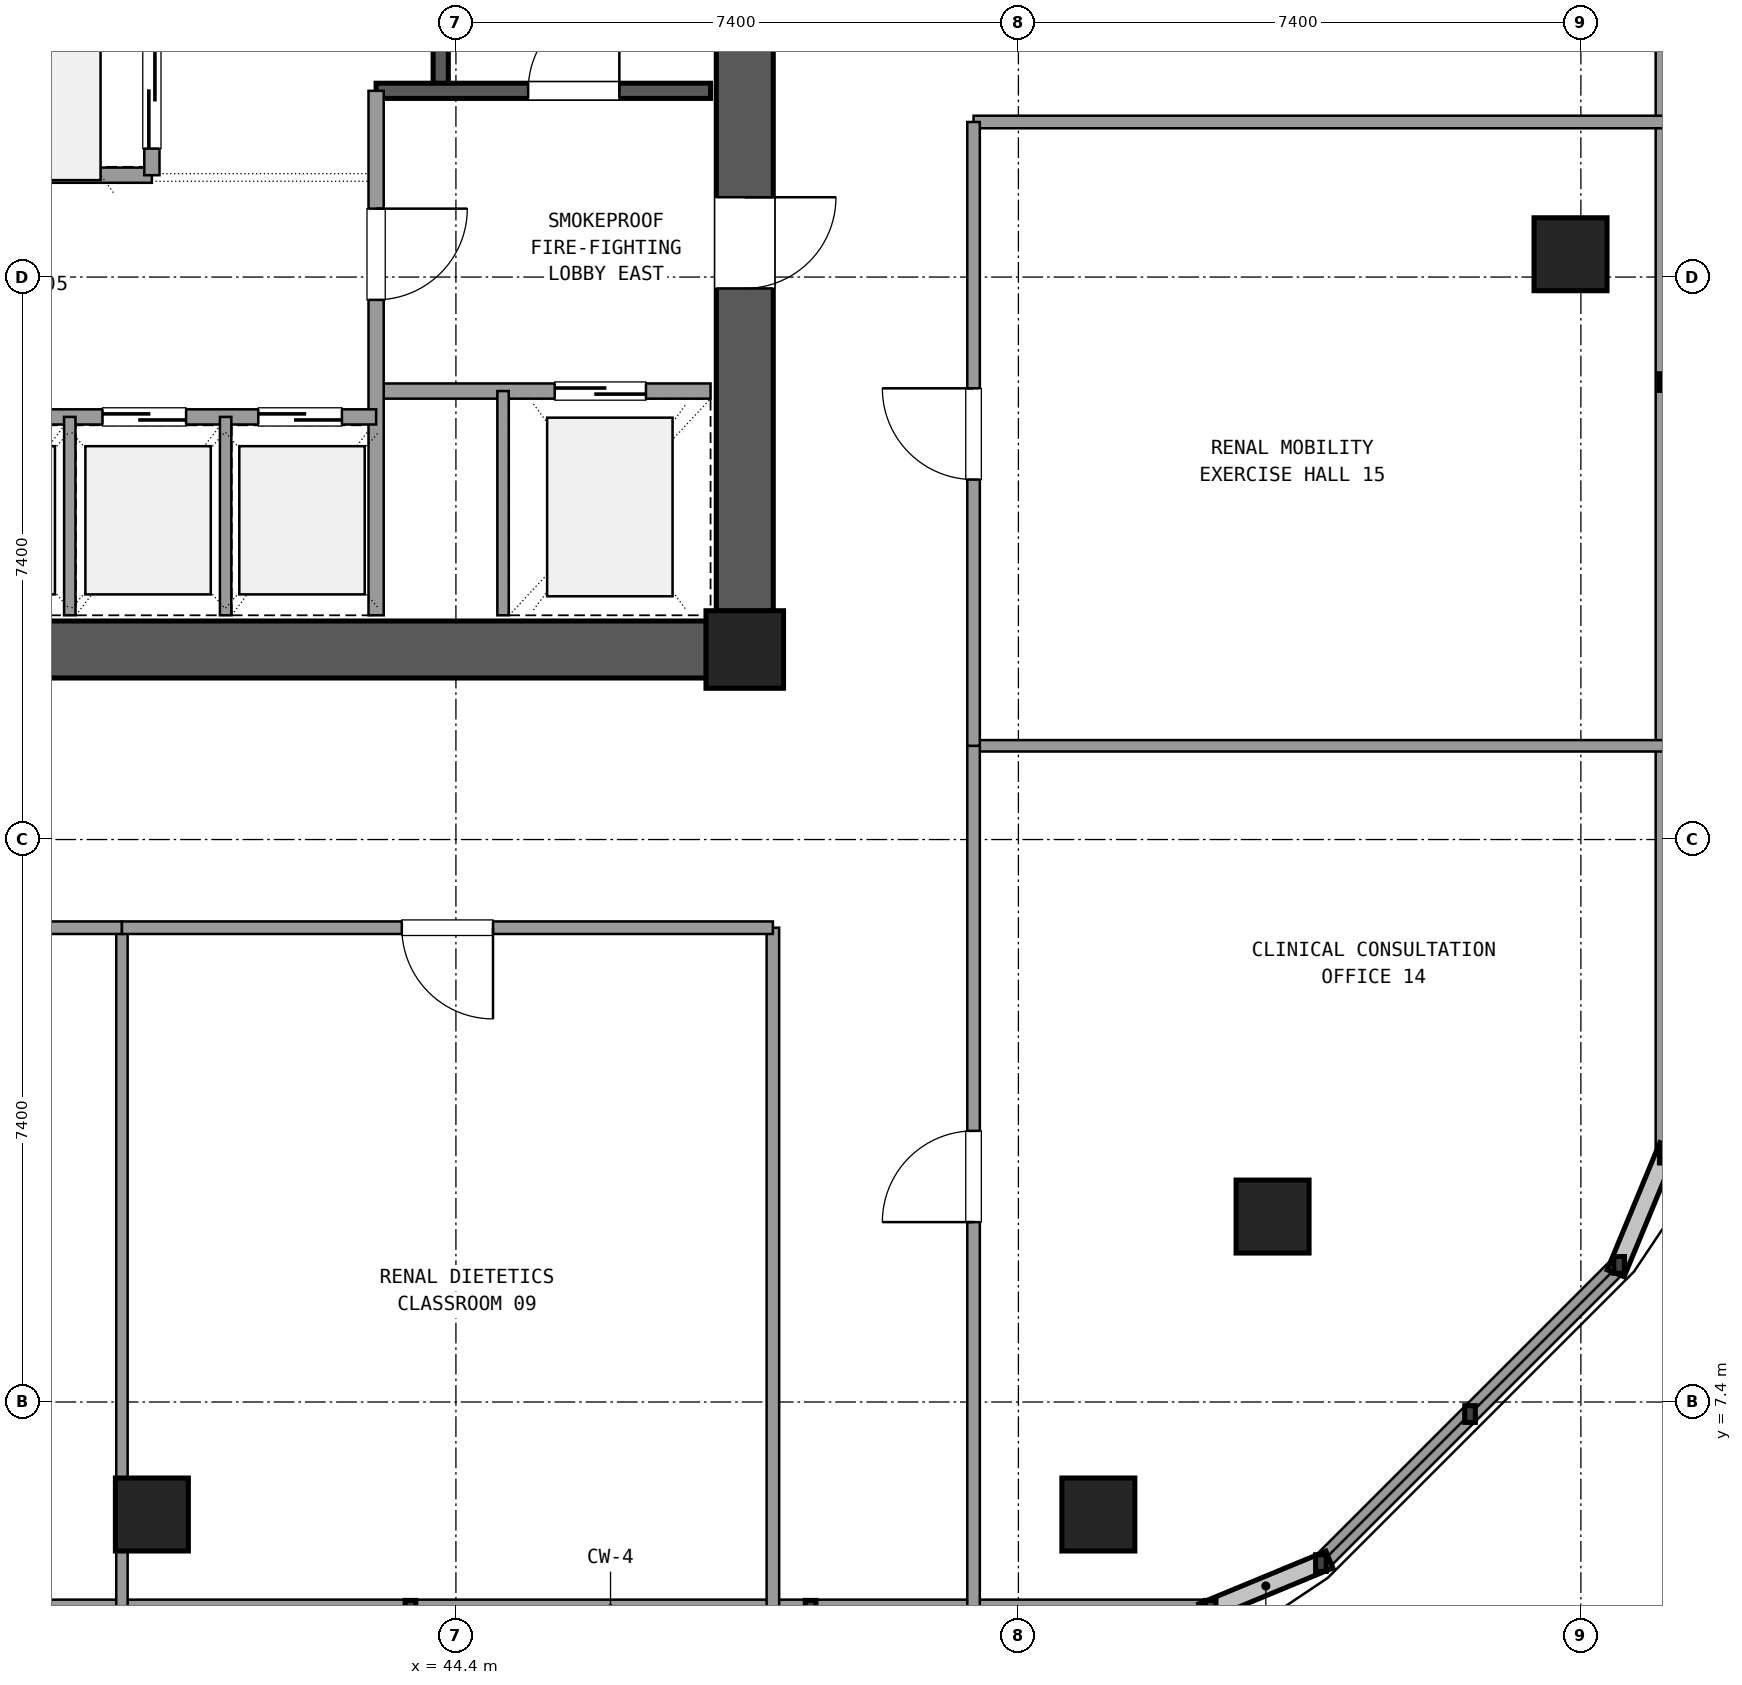
"""IFC4 building model, lengths in metres.
Left out: names, types, materials, properties, quantities, classifications, styles, units other than length and angle.
Written with IfcOpenShell. Run it as: python <this file> out.ifc"""

import sys

from ifc_helpers import new_model, si_unit, direction, frame, frame_2d, origin, origin_2d, place, context, subcontext, project, spatial, rectangle, extrude, element, fill, save


model = new_model("IFC4")
c1 = context("Model", 3, precision=1e-05, world=origin(), true_north=direction((0.0, 1.0)))
c2 = subcontext(c1, "Body", "Model", "MODEL_VIEW")
j1 = project(units=[si_unit("LENGTHUNIT", "METRE"), si_unit("PLANEANGLEUNIT", "RADIAN")], contexts=[c1])
p1 = place(None, origin())
s1 = spatial("IfcSite", under=j1, at=p1, CompositionType="ELEMENT")
p2 = place(p1, origin())
s2 = spatial("IfcBuilding", under=s1, at=p2, CompositionType="ELEMENT")
p3 = place(p2, frame((0.0, 0.0, 152.82)))
s3 = spatial("IfcBuildingStorey", under=s2, at=p3, CompositionType="ELEMENT", Elevation=152.82)
p4 = place(p3, frame((48.2, 17.3, 0.0), z_axis=(0.0, 0.0, 1.0), x_axis=(1.0, 0.0, 0.0)))
e1 = element("IfcColumn", 1, at=p4, inside=s3, PredefinedType="COLUMN", context=c2, shape_type="SweptSolid", body=[
    extrude(rectangle(XDim=1.02, YDim=1.02, at=origin_2d()), origin(), (0.0, 0.0, 1.0), 3.6),
])
p5 = place(p3, frame((37.505, 17.3, 0.0), z_axis=(0.0, 0.0, 1.0), x_axis=(1.0, 0.0, 0.0)))
e2 = element("IfcWall", 2, at=p5, inside=s3, PredefinedType="SHEAR", context=c2, shape_type="SweptSolid", body=[
    extrude(rectangle(XDim=10.19, YDim=0.75, at=frame_2d((5.095, 0.0))), origin(), (0.0, 0.0, 1.0), 3.32),
])
p6 = place(p3, frame((48.2, 17.805, 0.0), z_axis=(0.0, 0.0, 1.0), x_axis=(0.0, 1.0, 0.0)))
e3 = element("IfcWall", 3, at=p6, inside=s3, PredefinedType="SHEAR", context=c2, shape_type="SweptSolid", body=[
    extrude(rectangle(XDim=7.59, YDim=0.75, at=frame_2d((3.795, 0.0))), origin(), (0.0, 0.0, 1.0), 3.32),
])
p7 = place(p6, frame((4.245, 0.0, 0.0)))
e4 = element("IfcOpeningElement", 4, at=p7, cuts=e3, PredefinedType="OPENING", context=c2, shape_type="SweptSolid", body=[
    extrude(rectangle(XDim=1.2, YDim=2.15, at=frame_2d((0.6, 1.075))), frame((0.0, 0.385, 0.0), z_axis=(0.0, -1.0, 0.0), x_axis=(1.0, 0.0, 0.0)), (0.0, 0.0, 1.0), 0.77),
])
for number, where, z_axis, x_axis in (
    (5, (40.4, 5.92, 0.0), (0.0, 0.0, 1.0), (1.0, 0.0, 0.0)),
    (6, (52.852, 5.92, 0.0), (0.0, 0.0, 1.0), (1.0, 0.0, 0.0)),
    (7, (55.144, 9.84, 0.0), (0.0, 0.0, 1.0), (1.0, 0.0, 0.0)),
    (8, (59.064, 22.5, 0.0), (0.0, 0.0, 1.0), (1.0, 0.0, 0.0)),
):
    element("IfcColumn", number, at=place(p3, frame(where, z_axis=z_axis, x_axis=x_axis)), inside=s3, PredefinedType="COLUMN", context=c2, shape_type="SweptSolid", body=[
        extrude(rectangle(XDim=0.96, YDim=0.96, at=origin_2d()), origin(), (0.0, 0.0, 1.0), 3.6),
    ])
p8 = place(p3, frame((38.539, 4.68, 0.0), z_axis=(0.0, 0.0, 1.0), x_axis=(1.0, 0.0, 0.0)))
e9 = element("IfcWall", 9, at=p8, inside=s3, PredefinedType="SOLIDWALL", context=c2, shape_type="SweptSolid", body=[
    extrude(rectangle(XDim=15.79, YDim=0.24, at=frame_2d((7.895, 0.0))), origin(), (0.0, 0.0, 1.0), 0.85),
])
p9 = place(p3, frame((55.78, 5.281, 0.0), z_axis=(0.0, 0.0, 1.0), x_axis=(0.707084777957, 0.707128783731, 0.0)))
e10 = element("IfcWall", 10, at=p9, inside=s3, PredefinedType="SOLIDWALL", context=c2, shape_type="SweptSolid", body=[
    extrude(rectangle(XDim=5.548, YDim=0.24, at=frame_2d((2.774, 0.0))), origin(), (0.0, 0.0, 1.0), 0.85),
])
p10 = place(p3, frame((60.304, 10.655, 0.0), z_axis=(0.0, 0.0, 1.0), x_axis=(0.0, 1.0, 0.0)))
e11 = element("IfcWall", 11, at=p10, inside=s3, PredefinedType="SOLIDWALL", context=c2, shape_type="SweptSolid", body=[
    extrude(rectangle(XDim=30.49, YDim=0.24, at=frame_2d((15.245, 0.0))), origin(), (0.0, 0.0, 1.0), 0.85),
])
p11 = place(p3, frame((44.2, 24.65, 0.0), z_axis=(0.0, 0.0, 1.0), x_axis=(0.0, 1.0, 0.0)))
e12 = element("IfcWall", 12, at=p11, inside=s3, PredefinedType="SHEAR", context=c2, shape_type="SweptSolid", body=[
    extrude(rectangle(XDim=9.4, YDim=0.2, at=frame_2d((4.7, 0.0))), origin(), (0.0, 0.0, 1.0), 3.32),
])
p12 = place(p3, frame((43.35, 24.65, 0.0), z_axis=(0.0, 0.0, 1.0), x_axis=(1.0, 0.0, 0.0)))
e13 = element("IfcWall", 13, at=p12, inside=s3, PredefinedType="SHEAR", context=c2, shape_type="SweptSolid", body=[
    extrude(rectangle(XDim=4.4, YDim=0.2, at=frame_2d((2.2, 0.0))), origin(), (0.0, 0.0, 1.0), 3.32),
])
p13 = place(p12, frame((2.0, 0.0, 0.0)))
e14 = element("IfcOpeningElement", 14, at=p13, cuts=e13, PredefinedType="OPENING", context=c2, shape_type="SweptSolid", body=[
    extrude(rectangle(XDim=1.2, YDim=2.15, at=frame_2d((0.6, 1.075))), frame((0.0, 0.11, 0.0), z_axis=(0.0, -1.0, 0.0), x_axis=(1.0, 0.0, 0.0)), (0.0, 0.0, 1.0), 0.22),
])
p14 = place(p3, frame((43.35, 20.7, 0.0), z_axis=(0.0, 0.0, 1.0), x_axis=(1.0, 0.0, 0.0)))
e15 = element("IfcWall", 15, at=p14, inside=s3, PredefinedType="SOLIDWALL", context=c2, shape_type="SweptSolid", body=[
    extrude(rectangle(XDim=4.4, YDim=0.2, at=frame_2d((2.2, 0.0))), origin(), (0.0, 0.0, 1.0), 2.61),
])
p15 = place(p14, frame((2.35, 0.0, 0.0)))
e16 = element("IfcOpeningElement", 16, at=p15, cuts=e15, PredefinedType="OPENING", context=c2, shape_type="SweptSolid", body=[
    extrude(rectangle(XDim=1.2, YDim=2.15, at=frame_2d((0.6, 1.075))), frame((0.0, 0.11, 0.0), z_axis=(0.0, -1.0, 0.0), x_axis=(1.0, 0.0, 0.0)), (0.0, 0.0, 1.0), 0.22),
])
p16 = place(p3, frame((43.35, 17.75, 0.0), z_axis=(0.0, 0.0, 1.0), x_axis=(0.0, 1.0, 0.0)))
e17 = element("IfcWall", 17, at=p16, inside=s3, PredefinedType="SOLIDWALL", context=c2, shape_type="SweptSolid", body=[
    extrude(rectangle(XDim=6.9, YDim=0.2, at=frame_2d((3.45, 0.0))), origin(), (0.0, 0.0, 1.0), 2.61),
])
p17 = place(p16, frame((4.15, 0.0, 0.0)))
e18 = element("IfcOpeningElement", 18, at=p17, cuts=e17, PredefinedType="OPENING", context=c2, shape_type="SweptSolid", body=[
    extrude(rectangle(XDim=1.2, YDim=2.15, at=frame_2d((0.6, 1.075))), frame((0.0, 0.11, 0.0), z_axis=(0.0, -1.0, 0.0), x_axis=(1.0, 0.0, 0.0)), (0.0, 0.0, 1.0), 0.22),
])
p18 = place(p3, frame((45.02, 17.75, 0.0), z_axis=(0.0, 0.0, 1.0), x_axis=(0.0, 1.0, 0.0)))
e19 = element("IfcWall", 19, at=p18, inside=s3, PredefinedType="PARTITIONING", context=c2, shape_type="SweptSolid", body=[
    extrude(rectangle(XDim=2.95, YDim=0.15, at=frame_2d((1.475, 0.0))), origin(), (0.0, 0.0, 1.0), 2.61),
])
p19 = place(p3, frame((37.25, 20.36, 0.0), z_axis=(0.0, 0.0, 1.0), x_axis=(1.0, 0.0, 0.0)))
e20 = element("IfcWall", 20, at=p19, inside=s3, PredefinedType="SOLIDWALL", context=c2, shape_type="SweptSolid", body=[
    extrude(rectangle(XDim=6.1, YDim=0.2, at=frame_2d((3.05, 0.0))), origin(), (0.0, 0.0, 1.0), 2.61),
])
p20 = place(p19, frame((0.45, 0.0, 0.0)))
e21 = element("IfcOpeningElement", 21, at=p20, cuts=e20, PredefinedType="OPENING", context=c2, shape_type="SweptSolid", body=[
    extrude(rectangle(XDim=1.1, YDim=2.15, at=frame_2d((0.55, 1.075))), frame((0.0, 0.11, 0.0), z_axis=(0.0, -1.0, 0.0), x_axis=(1.0, 0.0, 0.0)), (0.0, 0.0, 1.0), 0.22),
])
p21 = place(p19, frame((2.5, 0.0, 0.0)))
e22 = element("IfcOpeningElement", 22, at=p21, cuts=e20, PredefinedType="OPENING", context=c2, shape_type="SweptSolid", body=[
    extrude(rectangle(XDim=1.1, YDim=2.15, at=frame_2d((0.55, 1.075))), frame((0.0, 0.11, 0.0), z_axis=(0.0, -1.0, 0.0), x_axis=(1.0, 0.0, 0.0)), (0.0, 0.0, 1.0), 0.22),
])
p22 = place(p19, frame((4.55, 0.0, 0.0)))
e23 = element("IfcOpeningElement", 23, at=p22, cuts=e20, PredefinedType="OPENING", context=c2, shape_type="SweptSolid", body=[
    extrude(rectangle(XDim=1.1, YDim=2.15, at=frame_2d((0.55, 1.075))), frame((0.0, 0.11, 0.0), z_axis=(0.0, -1.0, 0.0), x_axis=(1.0, 0.0, 0.0)), (0.0, 0.0, 1.0), 0.22),
])
for number, where, z_axis, x_axis in (
    (24, (39.32, 17.75, 0.0), (0.0, 0.0, 1.0), (0.0, 1.0, 0.0)),
    (25, (41.37, 17.75, 0.0), (0.0, 0.0, 1.0), (0.0, 1.0, 0.0)),
):
    element("IfcWall", number, at=place(p3, frame(where, z_axis=z_axis, x_axis=x_axis)), inside=s3, PredefinedType="PARTITIONING", context=c2, shape_type="SweptSolid", body=[
        extrude(rectangle(XDim=2.61, YDim=0.15, at=frame_2d((1.305, 0.0))), origin(), (0.0, 0.0, 1.0), 2.61),
    ])
p23 = place(p3, frame((37.35, 23.54, 0.0), z_axis=(0.0, 0.0, 1.0), x_axis=(1.0, 0.0, 0.0)))
e26 = element("IfcWall", 26, at=p23, inside=s3, PredefinedType="SOLIDWALL", context=c2, shape_type="SweptSolid", body=[
    extrude(rectangle(XDim=3.05, YDim=0.2, at=frame_2d((1.525, 0.0))), origin(), (0.0, 0.0, 1.0), 2.61),
])
p24 = place(p3, frame((40.4, 23.54, 0.0), z_axis=(0.0, 0.0, 1.0), x_axis=(0.0, 1.0, 0.0)))
e27 = element("IfcWall", 27, at=p24, inside=s3, PredefinedType="SOLIDWALL", context=c2, shape_type="SweptSolid", body=[
    extrude(rectangle(XDim=6.82, YDim=0.2, at=frame_2d((3.41, 0.0))), origin(), (0.0, 0.0, 1.0), 2.61),
])
p25 = place(p24, frame((0.35, 0.0, 0.0)))
e28 = element("IfcOpeningElement", 28, at=p25, cuts=e27, PredefinedType="OPENING", context=c2, shape_type="SweptSolid", body=[
    extrude(rectangle(XDim=1.4, YDim=2.2, at=frame_2d((0.7, 1.1))), frame((0.0, 0.11, 0.0), z_axis=(0.0, -1.0, 0.0), x_axis=(1.0, 0.0, 0.0)), (0.0, 0.0, 1.0), 0.22),
])
p26 = place(p24, frame((2.65, 0.0, 0.0)))
e29 = element("IfcOpeningElement", 29, at=p26, cuts=e27, PredefinedType="OPENING", context=c2, shape_type="SweptSolid", body=[
    extrude(rectangle(XDim=1.4, YDim=2.2, at=frame_2d((0.7, 1.1))), frame((0.0, 0.11, 0.0), z_axis=(0.0, -1.0, 0.0), x_axis=(1.0, 0.0, 0.0)), (0.0, 0.0, 1.0), 0.22),
])
p27 = place(p24, frame((4.85, 0.0, 0.0)))
e30 = element("IfcOpeningElement", 30, at=p27, cuts=e27, PredefinedType="OPENING", context=c2, shape_type="SweptSolid", body=[
    extrude(rectangle(XDim=1.4, YDim=2.2, at=frame_2d((0.7, 1.1))), frame((0.0, 0.11, 0.0), z_axis=(0.0, -1.0, 0.0), x_axis=(1.0, 0.0, 0.0)), (0.0, 0.0, 1.0), 0.22),
])
p28 = place(p3, frame((48.57, 4.7, 0.0), z_axis=(0.0, 0.0, 1.0), x_axis=(0.0, 1.0, 0.0)))
e31 = element("IfcWall", 31, at=p28, inside=s3, PredefinedType="PARTITIONING", context=c2, shape_type="SweptSolid", body=[
    extrude(rectangle(XDim=8.94, YDim=0.165, at=frame_2d((4.47, 0.0))), origin(), (0.0, 0.0, 1.0), 2.61),
])
p29 = place(p3, frame((51.21, 24.24, 0.0), z_axis=(0.0, 0.0, 1.0), x_axis=(1.0, 0.0, 0.0)))
e32 = element("IfcWall", 32, at=p29, inside=s3, PredefinedType="PARTITIONING", context=c2, shape_type="SweptSolid", body=[
    extrude(rectangle(XDim=9.074, YDim=0.165, at=frame_2d((4.537, 0.0))), origin(), (0.0, 0.0, 1.0), 2.61),
])
p30 = place(p3, frame((40.006, 13.64, 0.0), z_axis=(0.0, 0.0, 1.0), x_axis=(0.0, -1.0, 0.0)))
e33 = element("IfcWall", 33, at=p30, inside=s3, PredefinedType="PARTITIONING", context=c2, shape_type="SweptSolid", body=[
    extrude(rectangle(XDim=8.94, YDim=0.15, at=frame_2d((4.47, 0.0))), origin(), (0.0, 0.0, 1.0), 2.61),
])
p31 = place(p3, frame((33.888, 13.64, 0.0), z_axis=(0.0, 0.0, 1.0), x_axis=(1.0, 0.0, 0.0)))
e34 = element("IfcWall", 34, at=p31, inside=s3, PredefinedType="PARTITIONING", context=c2, shape_type="SweptSolid", body=[
    extrude(rectangle(XDim=6.118, YDim=0.165, at=frame_2d((3.059, 0.0))), origin(), (0.0, 0.0, 1.0), 2.61),
])
p32 = place(p31, frame((1.664, 0.0, 0.0)))
e35 = element("IfcOpeningElement", 35, at=p32, cuts=e34, PredefinedType="OPENING", context=c2, shape_type="SweptSolid", body=[
    extrude(rectangle(XDim=1.2, YDim=2.15, at=frame_2d((0.6, 1.075))), frame((0.0, 0.093, 0.0), z_axis=(0.0, -1.0, 0.0), x_axis=(1.0, 0.0, 0.0)), (0.0, 0.0, 1.0), 0.185),
])
p33 = place(p3, frame((40.006, 13.64, 0.0), z_axis=(0.0, 0.0, 1.0), x_axis=(1.0, 0.0, 0.0)))
e36 = element("IfcWall", 36, at=p33, inside=s3, PredefinedType="PARTITIONING", context=c2, shape_type="SweptSolid", body=[
    extrude(rectangle(XDim=8.564, YDim=0.165, at=frame_2d((4.282, 0.0))), origin(), (0.0, 0.0, 1.0), 2.61),
])
p34 = place(p33, frame((3.682, 0.0, 0.0)))
e37 = element("IfcOpeningElement", 37, at=p34, cuts=e36, PredefinedType="OPENING", context=c2, shape_type="SweptSolid", body=[
    extrude(rectangle(XDim=1.2, YDim=2.15, at=frame_2d((0.6, 1.075))), frame((0.0, 0.093, 0.0), z_axis=(0.0, -1.0, 0.0), x_axis=(1.0, 0.0, 0.0)), (0.0, 0.0, 1.0), 0.185),
])
p35 = place(p3, frame((51.21, 16.033, 0.0), z_axis=(0.0, 0.0, 1.0), x_axis=(1.0, 0.0, 0.0)))
e38 = element("IfcWall", 38, at=p35, inside=s3, PredefinedType="PARTITIONING", context=c2, shape_type="SweptSolid", body=[
    extrude(rectangle(XDim=9.074, YDim=0.15, at=frame_2d((4.537, 0.0))), origin(), (0.0, 0.0, 1.0), 2.61),
])
p36 = place(p3, frame((51.21, 4.7, 0.0), z_axis=(0.0, 0.0, 1.0), x_axis=(0.0, 1.0, 0.0)))
e39 = element("IfcWall", 39, at=p36, inside=s3, PredefinedType="PARTITIONING", context=c2, shape_type="SweptSolid", body=[
    extrude(rectangle(XDim=11.333, YDim=0.165, at=frame_2d((5.667, 0.0))), origin(), (0.0, 0.0, 1.0), 2.61),
])
p37 = place(p36, frame((5.067, 0.0, 0.0)))
e40 = element("IfcOpeningElement", 40, at=p37, cuts=e39, PredefinedType="OPENING", context=c2, shape_type="SweptSolid", body=[
    extrude(rectangle(XDim=1.2, YDim=2.15, at=frame_2d((0.6, 1.075))), frame((0.0, 0.093, 0.0), z_axis=(0.0, -1.0, 0.0), x_axis=(1.0, 0.0, 0.0)), (0.0, 0.0, 1.0), 0.185),
])
p38 = place(p3, frame((51.21, 16.033, 0.0), z_axis=(0.0, 0.0, 1.0), x_axis=(0.0, 1.0, 0.0)))
e41 = element("IfcWall", 41, at=p38, inside=s3, PredefinedType="PARTITIONING", context=c2, shape_type="SweptSolid", body=[
    extrude(rectangle(XDim=8.207, YDim=0.165, at=frame_2d((4.104, 0.0))), origin(), (0.0, 0.0, 1.0), 2.61),
])
p39 = place(p38, frame((3.503, 0.0, 0.0)))
e42 = element("IfcOpeningElement", 42, at=p39, cuts=e41, PredefinedType="OPENING", context=c2, shape_type="SweptSolid", body=[
    extrude(rectangle(XDim=1.2, YDim=2.15, at=frame_2d((0.6, 1.075))), frame((0.0, 0.093, 0.0), z_axis=(0.0, -1.0, 0.0), x_axis=(1.0, 0.0, 0.0)), (0.0, 0.0, 1.0), 0.185),
])
p40 = place(p13, origin())
e43 = element("IfcDoor", 43, at=p40, inside=s3, OperationType="SINGLE_SWING_RIGHT", PredefinedType="DOOR", context=c2, shape_type="SweptSolid", body=[
    extrude(rectangle(XDim=1.2, YDim=2.15, at=frame_2d((0.6, 1.075))), frame((0.0, 0.025, 0.0), z_axis=(0.0, -1.0, 0.0), x_axis=(1.0, 0.0, 0.0)), (0.0, 0.0, 1.0), 0.05),
])
fill(e14, e43)
p41 = place(p15, origin())
e44 = element("IfcDoor", 44, at=p41, inside=s3, OperationType="SLIDING_TO_RIGHT", PredefinedType="DOOR", context=c2, shape_type="SweptSolid", body=[
    extrude(rectangle(XDim=1.2, YDim=2.15, at=frame_2d((0.6, 1.075))), frame((0.0, 0.025, 0.0), z_axis=(0.0, -1.0, 0.0), x_axis=(1.0, 0.0, 0.0)), (0.0, 0.0, 1.0), 0.05),
])
fill(e16, e44)
p42 = place(p17, frame((1.2, 0.0, 0.0), z_axis=(0.0, 0.0, 1.0), x_axis=(-1.0, 0.0, 0.0)))
e45 = element("IfcDoor", 45, at=p42, inside=s3, OperationType="SINGLE_SWING_RIGHT", PredefinedType="DOOR", context=c2, shape_type="SweptSolid", body=[
    extrude(rectangle(XDim=1.2, YDim=2.15, at=frame_2d((0.6, 1.075))), frame((0.0, 0.025, 0.0), z_axis=(0.0, -1.0, 0.0), x_axis=(1.0, 0.0, 0.0)), (0.0, 0.0, 1.0), 0.05),
])
fill(e18, e45)
p43 = place(p7, frame((1.2, 0.0, 0.0), z_axis=(0.0, 0.0, 1.0), x_axis=(-1.0, 0.0, 0.0)))
e46 = element("IfcDoor", 46, at=p43, inside=s3, OperationType="SINGLE_SWING_RIGHT", PredefinedType="DOOR", context=c2, shape_type="SweptSolid", body=[
    extrude(rectangle(XDim=1.2, YDim=2.15, at=frame_2d((0.6, 1.075))), frame((0.0, 0.025, 0.0), z_axis=(0.0, -1.0, 0.0), x_axis=(1.0, 0.0, 0.0)), (0.0, 0.0, 1.0), 0.05),
])
fill(e4, e46)
p44 = place(p21, origin())
e47 = element("IfcDoor", 47, at=p44, inside=s3, OperationType="SLIDING_TO_LEFT", PredefinedType="DOOR", context=c2, shape_type="SweptSolid", body=[
    extrude(rectangle(XDim=1.1, YDim=2.15, at=frame_2d((0.55, 1.075))), frame((0.0, 0.025, 0.0), z_axis=(0.0, -1.0, 0.0), x_axis=(1.0, 0.0, 0.0)), (0.0, 0.0, 1.0), 0.05),
])
fill(e22, e47)
p45 = place(p22, origin())
e48 = element("IfcDoor", 48, at=p45, inside=s3, OperationType="SLIDING_TO_LEFT", PredefinedType="DOOR", context=c2, shape_type="SweptSolid", body=[
    extrude(rectangle(XDim=1.1, YDim=2.15, at=frame_2d((0.55, 1.075))), frame((0.0, 0.025, 0.0), z_axis=(0.0, -1.0, 0.0), x_axis=(1.0, 0.0, 0.0)), (0.0, 0.0, 1.0), 0.05),
])
fill(e23, e48)
p46 = place(p25, origin())
e49 = element("IfcDoor", 49, at=p46, inside=s3, OperationType="SLIDING_TO_LEFT", PredefinedType="DOOR", context=c2, shape_type="SweptSolid", body=[
    extrude(rectangle(XDim=1.4, YDim=2.2, at=frame_2d((0.7, 1.1))), frame((0.0, 0.025, 0.0), z_axis=(0.0, -1.0, 0.0), x_axis=(1.0, 0.0, 0.0)), (0.0, 0.0, 1.0), 0.05),
])
fill(e28, e49)
p47 = place(p34, frame((1.2, 0.0, 0.0), z_axis=(0.0, 0.0, 1.0), x_axis=(-1.0, 0.0, 0.0)))
e50 = element("IfcDoor", 50, at=p47, inside=s3, OperationType="SINGLE_SWING_RIGHT", PredefinedType="DOOR", context=c2, shape_type="SweptSolid", body=[
    extrude(rectangle(XDim=1.2, YDim=2.15, at=frame_2d((0.6, 1.075))), frame((0.0, 0.025, 0.0), z_axis=(0.0, -1.0, 0.0), x_axis=(1.0, 0.0, 0.0)), (0.0, 0.0, 1.0), 0.05),
])
fill(e37, e50)
p48 = place(p37, origin())
e51 = element("IfcDoor", 51, at=p48, inside=s3, OperationType="SINGLE_SWING_LEFT", PredefinedType="DOOR", context=c2, shape_type="SweptSolid", body=[
    extrude(rectangle(XDim=1.2, YDim=2.15, at=frame_2d((0.6, 1.075))), frame((0.0, 0.025, 0.0), z_axis=(0.0, -1.0, 0.0), x_axis=(1.0, 0.0, 0.0)), (0.0, 0.0, 1.0), 0.05),
])
fill(e40, e51)
p49 = place(p39, origin())
e52 = element("IfcDoor", 52, at=p49, inside=s3, OperationType="SINGLE_SWING_RIGHT", PredefinedType="DOOR", context=c2, shape_type="SweptSolid", body=[
    extrude(rectangle(XDim=1.2, YDim=2.15, at=frame_2d((0.6, 1.075))), frame((0.0, 0.025, 0.0), z_axis=(0.0, -1.0, 0.0), x_axis=(1.0, 0.0, 0.0)), (0.0, 0.0, 1.0), 0.05),
])
fill(e42, e52)
save(model, sys.argv[1])
